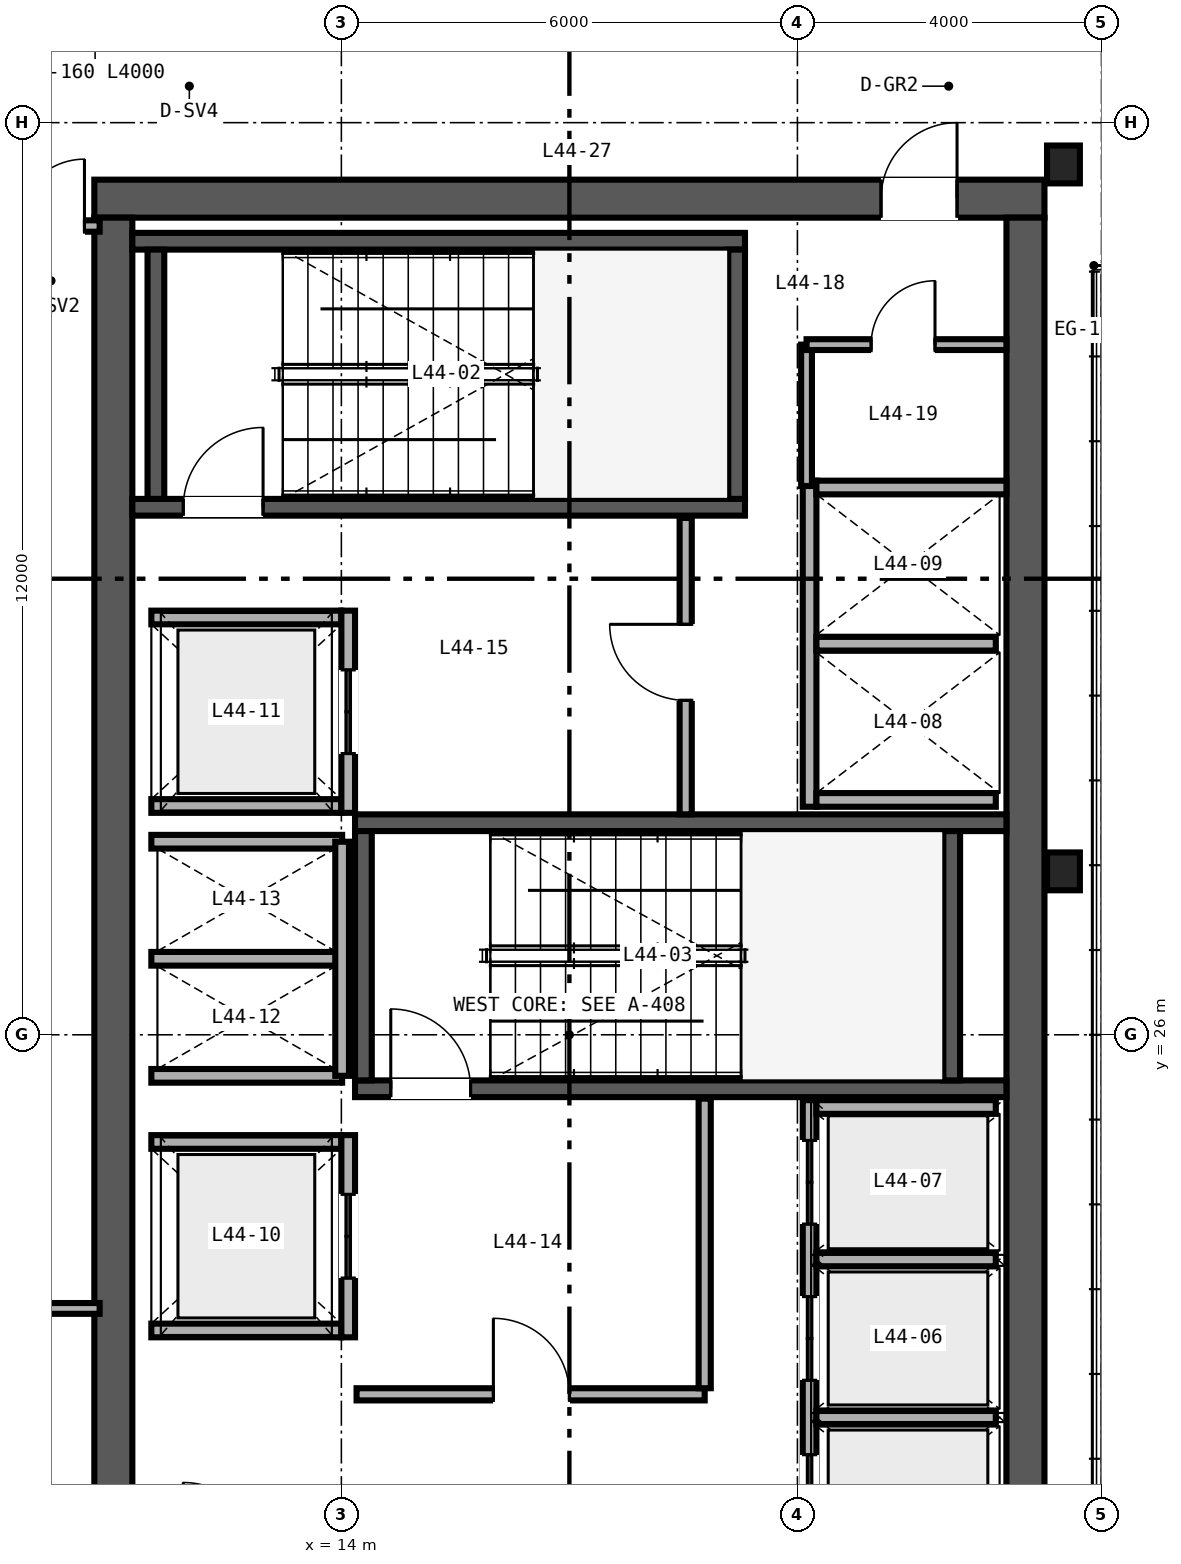
"""IFC4 building model, lengths in metres.
Left out: names, types, materials, properties, quantities, classifications, styles, units other than length and angle.
Written with IfcOpenShell. Run it as: python <this file> out.ifc"""

import sys

from ifc_helpers import new_model, si_unit, direction, frame, frame_2d, origin, origin_2d, place, context, subcontext, project, spatial, rectangle, i_section, extrude, source, transform, mapped, element, fill, save


model = new_model("IFC4")
c1 = context("Model", 3, precision=1e-05, world=origin(), true_north=direction((0.0, 1.0)))
c2 = subcontext(c1, "Body", "Model", "MODEL_VIEW")
j1 = project(units=[si_unit("LENGTHUNIT", "METRE"), si_unit("PLANEANGLEUNIT", "RADIAN")], contexts=[c1])
p1 = place(None, origin())
s1 = spatial("IfcSite", under=j1, at=p1, CompositionType="ELEMENT")
p2 = place(p1, origin())
s2 = spatial("IfcBuilding", under=s1, at=p2, CompositionType="ELEMENT")
p3 = place(p2, frame((0.0, 0.0, 177.6)))
s3 = spatial("IfcBuildingStorey", under=s2, at=p3, CompositionType="ELEMENT", Elevation=177.6)
p4 = place(p3, frame((10.75, 37.0, 0.0), z_axis=(0.0, 0.0, 1.0), x_axis=(1.0, 0.0, 0.0)))
e1 = element("IfcWall", 1, at=p4, inside=s3, PredefinedType="SHEAR", context=c2, shape_type="SweptSolid", body=[
    extrude(rectangle(XDim=12.5, YDim=0.5, at=frame_2d((6.25, 0.0))), origin(), (0.0, 0.0, 1.0), 3.37),
])
p5 = place(p4, frame((10.35, 0.0, 0.0)))
e2 = element("IfcOpeningElement", 2, at=p5, cuts=e1, PredefinedType="OPENING", context=c2, shape_type="SweptSolid", body=[
    extrude(rectangle(XDim=1.0, YDim=2.15, at=frame_2d((0.5, 1.075))), frame((0.0, 0.26, 0.0), z_axis=(0.0, -1.0, 0.0), x_axis=(1.0, 0.0, 0.0)), (0.0, 0.0, 1.0), 0.52),
])
for number, where, z_axis, x_axis in (
    (3, (11.0, 15.25, 0.0), (0.0, 0.0, 1.0), (0.0, 1.0, 0.0)),
    (4, (23.0, 15.25, 0.0), (0.0, 0.0, 1.0), (0.0, 1.0, 0.0)),
):
    element("IfcWall", number, at=place(p3, frame(where, z_axis=z_axis, x_axis=x_axis)), inside=s3, PredefinedType="SHEAR", context=c2, shape_type="SweptSolid", body=[
        extrude(rectangle(XDim=21.5, YDim=0.5, at=frame_2d((10.75, 0.0))), origin(), (0.0, 0.0, 1.0), 3.37),
    ])
p6 = place(p3, frame((11.25, 32.94, 0.0), z_axis=(0.0, 0.0, 1.0), x_axis=(1.0, 0.0, 0.0)))
e5 = element("IfcWall", 5, at=p6, inside=s3, PredefinedType="SHEAR", context=c2, shape_type="SweptSolid", body=[
    extrude(rectangle(XDim=8.06, YDim=0.22, at=frame_2d((4.03, 0.0))), origin(), (0.0, 0.0, 1.0), 3.4),
])
p7 = place(p6, frame((0.67, 0.0, 0.0)))
e6 = element("IfcOpeningElement", 6, at=p7, cuts=e5, PredefinedType="OPENING", context=c2, shape_type="SweptSolid", body=[
    extrude(rectangle(XDim=1.05, YDim=2.15, at=frame_2d((0.525, 1.075))), frame((0.0, 0.12, 0.0), z_axis=(0.0, -1.0, 0.0), x_axis=(1.0, 0.0, 0.0)), (0.0, 0.0, 1.0), 0.24),
])
p8 = place(p3, frame((11.25, 36.44, 0.0), z_axis=(0.0, 0.0, 1.0), x_axis=(1.0, 0.0, 0.0)))
e7 = element("IfcWall", 7, at=p8, inside=s3, PredefinedType="SHEAR", context=c2, shape_type="SweptSolid", body=[
    extrude(rectangle(XDim=8.06, YDim=0.22, at=frame_2d((4.03, 0.0))), origin(), (0.0, 0.0, 1.0), 3.4),
])
for number, where, z_axis, x_axis in (
    (8, (11.56, 33.05, 0.0), (0.0, 0.0, 1.0), (0.0, 1.0, 0.0)),
    (9, (19.2, 33.05, 0.0), (0.0, 0.0, 1.0), (0.0, 1.0, 0.0)),
):
    element("IfcWall", number, at=place(p3, frame(where, z_axis=z_axis, x_axis=x_axis)), inside=s3, PredefinedType="SHEAR", context=c2, shape_type="SweptSolid", body=[
        extrude(rectangle(XDim=3.28, YDim=0.22, at=frame_2d((1.64, 0.0))), origin(), (0.0, 0.0, 1.0), 3.4),
    ])
p9 = place(p3, frame((14.18, 25.29, 0.0), z_axis=(0.0, 0.0, 1.0), x_axis=(1.0, 0.0, 0.0)))
e10 = element("IfcWall", 10, at=p9, inside=s3, PredefinedType="SHEAR", context=c2, shape_type="SweptSolid", body=[
    extrude(rectangle(XDim=8.57, YDim=0.22, at=frame_2d((4.285, 0.0))), origin(), (0.0, 0.0, 1.0), 3.4),
])
p10 = place(p9, frame((0.47, 0.0, 0.0)))
e11 = element("IfcOpeningElement", 11, at=p10, cuts=e10, PredefinedType="OPENING", context=c2, shape_type="SweptSolid", body=[
    extrude(rectangle(XDim=1.05, YDim=2.15, at=frame_2d((0.525, 1.075))), frame((0.0, 0.12, 0.0), z_axis=(0.0, -1.0, 0.0), x_axis=(1.0, 0.0, 0.0)), (0.0, 0.0, 1.0), 0.24),
])
p11 = place(p3, frame((14.18, 28.79, 0.0), z_axis=(0.0, 0.0, 1.0), x_axis=(1.0, 0.0, 0.0)))
e12 = element("IfcWall", 12, at=p11, inside=s3, PredefinedType="SHEAR", context=c2, shape_type="SweptSolid", body=[
    extrude(rectangle(XDim=8.57, YDim=0.22, at=frame_2d((4.285, 0.0))), origin(), (0.0, 0.0, 1.0), 3.4),
])
for number, where, z_axis, x_axis in (
    (13, (14.29, 25.4, 0.0), (0.0, 0.0, 1.0), (0.0, 1.0, 0.0)),
    (14, (22.03, 25.4, 0.0), (0.0, 0.0, 1.0), (0.0, 1.0, 0.0)),
):
    element("IfcWall", number, at=place(p3, frame(where, z_axis=z_axis, x_axis=x_axis)), inside=s3, PredefinedType="SHEAR", context=c2, shape_type="SweptSolid", body=[
        extrude(rectangle(XDim=3.28, YDim=0.22, at=frame_2d((1.64, 0.0))), origin(), (0.0, 0.0, 1.0), 3.4),
    ])
m1 = source(origin(), c2, "Body", "SweptSolid", [
    extrude(i_section(OverallWidth=0.432, OverallDepth=0.498, WebThickness=0.056, FlangeThickness=0.089, FilletRadius=0.025, at=origin_2d()), origin(), (0.0, 0.0, 1.0), 3.37),
])
for number, where, z_axis, x_axis in (
    (15, (23.5, 28.15, 0.0), (0.0, 0.0, 1.0), (1.0, 0.0, 0.0)),
    (16, (23.5, 37.45, 0.0), (0.0, 0.0, 1.0), (1.0, 0.0, 0.0)),
):
    element("IfcColumn", number, at=place(p3, frame(where, z_axis=z_axis, x_axis=x_axis)), inside=s3, PredefinedType="COLUMN", context=c2, shape_type="MappedRepresentation", body=[
        mapped(m1, transform((0.0, 0.0, 0.0), scale=1.0)),
    ])
p12 = place(p3, frame((20.16, 18.82, 0.0), z_axis=(0.0, 0.0, 1.0), x_axis=(0.0, 1.0, 0.0)))
e17 = element("IfcWall", 17, at=p12, inside=s3, PredefinedType="SOLIDWALL", context=c2, shape_type="SweptSolid", body=[
    extrude(rectangle(XDim=6.32, YDim=0.18, at=frame_2d((3.16, 0.0))), origin(), (0.0, 0.0, 1.0), 2.47),
])
p13 = place(p12, frame((0.555, 0.0, 0.0)))
e18 = element("IfcOpeningElement", 18, at=p13, cuts=e17, PredefinedType="OPENING", context=c2, shape_type="SweptSolid", body=[
    extrude(rectangle(XDim=1.1, YDim=2.2, at=frame_2d((0.55, 1.1))), frame((0.0, 0.1, 0.0), z_axis=(0.0, -1.0, 0.0), x_axis=(1.0, 0.0, 0.0)), (0.0, 0.0, 1.0), 0.2),
])
p14 = place(p12, frame((2.635, 0.0, 0.0)))
e19 = element("IfcOpeningElement", 19, at=p14, cuts=e17, PredefinedType="OPENING", context=c2, shape_type="SweptSolid", body=[
    extrude(rectangle(XDim=1.1, YDim=2.2, at=frame_2d((0.55, 1.1))), frame((0.0, 0.1, 0.0), z_axis=(0.0, -1.0, 0.0), x_axis=(1.0, 0.0, 0.0)), (0.0, 0.0, 1.0), 0.2),
])
p15 = place(p12, frame((4.69, 0.0, 0.0)))
e20 = element("IfcOpeningElement", 20, at=p15, cuts=e17, PredefinedType="OPENING", context=c2, shape_type="SweptSolid", body=[
    extrude(rectangle(XDim=1.1, YDim=2.2, at=frame_2d((0.55, 1.1))), frame((0.0, 0.1, 0.0), z_axis=(0.0, -1.0, 0.0), x_axis=(1.0, 0.0, 0.0)), (0.0, 0.0, 1.0), 0.2),
])
p16 = place(p3, frame((20.25, 25.05, 0.0), z_axis=(0.0, 0.0, 1.0), x_axis=(1.0, 0.0, 0.0)))
e21 = element("IfcWall", 21, at=p16, inside=s3, PredefinedType="SOLIDWALL", context=c2, shape_type="SweptSolid", body=[
    extrude(rectangle(XDim=2.36, YDim=0.18, at=frame_2d((1.18, 0.0))), origin(), (0.0, 0.0, 1.0), 3.37),
])
p17 = place(p3, frame((20.25, 20.965, 0.0), z_axis=(0.0, 0.0, 1.0), x_axis=(1.0, 0.0, 0.0)))
e22 = element("IfcWall", 22, at=p17, inside=s3, PredefinedType="SOLIDWALL", context=c2, shape_type="SweptSolid", body=[
    extrude(rectangle(XDim=2.36, YDim=0.18, at=frame_2d((1.18, 0.0))), origin(), (0.0, 0.0, 1.0), 2.47),
])
p18 = place(p3, frame((20.25, 23.045, 0.0), z_axis=(0.0, 0.0, 1.0), x_axis=(1.0, 0.0, 0.0)))
e23 = element("IfcWall", 23, at=p18, inside=s3, PredefinedType="SOLIDWALL", context=c2, shape_type="SweptSolid", body=[
    extrude(rectangle(XDim=2.36, YDim=0.18, at=frame_2d((1.18, 0.0))), origin(), (0.0, 0.0, 1.0), 3.37),
])
p19 = place(p3, frame((20.16, 29.0, 0.0), z_axis=(0.0, 0.0, 1.0), x_axis=(0.0, 1.0, 0.0)))
e24 = element("IfcWall", 24, at=p19, inside=s3, PredefinedType="SOLIDWALL", context=c2, shape_type="SweptSolid", body=[
    extrude(rectangle(XDim=4.29, YDim=0.18, at=frame_2d((2.145, 0.0))), origin(), (0.0, 0.0, 1.0), 3.37),
])
p20 = place(p3, frame((20.25, 29.09, 0.0), z_axis=(0.0, 0.0, 1.0), x_axis=(1.0, 0.0, 0.0)))
e25 = element("IfcWall", 25, at=p20, inside=s3, PredefinedType="SOLIDWALL", context=c2, shape_type="SweptSolid", body=[
    extrude(rectangle(XDim=2.36, YDim=0.18, at=frame_2d((1.18, 0.0))), origin(), (0.0, 0.0, 1.0), 3.37),
])
p21 = place(p3, frame((20.25, 33.2, 0.0), z_axis=(0.0, 0.0, 1.0), x_axis=(1.0, 0.0, 0.0)))
e26 = element("IfcWall", 26, at=p21, inside=s3, PredefinedType="SOLIDWALL", context=c2, shape_type="SweptSolid", body=[
    extrude(rectangle(XDim=2.5, YDim=0.18, at=frame_2d((1.25, 0.0))), origin(), (0.0, 0.0, 1.0), 3.37),
])
p22 = place(p3, frame((20.25, 31.145, 0.0), z_axis=(0.0, 0.0, 1.0), x_axis=(1.0, 0.0, 0.0)))
e27 = element("IfcWall", 27, at=p22, inside=s3, PredefinedType="SOLIDWALL", context=c2, shape_type="SweptSolid", body=[
    extrude(rectangle(XDim=2.36, YDim=0.18, at=frame_2d((1.18, 0.0))), origin(), (0.0, 0.0, 1.0), 3.37),
])
for number, where, z_axis, x_axis in (
    (28, (11.5, 22.11, 0.0), (0.0, 0.0, 1.0), (1.0, 0.0, 0.0)),
    (29, (11.5, 24.59, 0.0), (0.0, 0.0, 1.0), (1.0, 0.0, 0.0)),
):
    element("IfcWall", number, at=place(p3, frame(where, z_axis=z_axis, x_axis=x_axis)), inside=s3, PredefinedType="SOLIDWALL", context=c2, shape_type="SweptSolid", body=[
        extrude(rectangle(XDim=2.5, YDim=0.18, at=frame_2d((1.25, 0.0))), origin(), (0.0, 0.0, 1.0), 3.37),
    ])
p23 = place(p3, frame((14.09, 22.02, 0.0), z_axis=(0.0, 0.0, 1.0), x_axis=(0.0, 1.0, 0.0)))
e30 = element("IfcWall", 30, at=p23, inside=s3, PredefinedType="SOLIDWALL", context=c2, shape_type="SweptSolid", body=[
    extrude(rectangle(XDim=2.66, YDim=0.18, at=frame_2d((1.33, 0.0))), origin(), (0.0, 0.0, 1.0), 3.37),
])
p24 = place(p23, frame((0.78, 0.0, 0.0)))
e31 = element("IfcOpeningElement", 31, at=p24, cuts=e30, PredefinedType="OPENING", context=c2, shape_type="SweptSolid", body=[
    extrude(rectangle(XDim=1.1, YDim=2.2, at=frame_2d((0.55, 1.1))), frame((0.0, 0.1, 0.0), z_axis=(0.0, -1.0, 0.0), x_axis=(1.0, 0.0, 0.0)), (0.0, 0.0, 1.0), 0.2),
])
for number, where, z_axis, x_axis in (
    (32, (11.5, 29.01, 0.0), (0.0, 0.0, 1.0), (1.0, 0.0, 0.0)),
    (33, (11.5, 31.49, 0.0), (0.0, 0.0, 1.0), (1.0, 0.0, 0.0)),
):
    element("IfcWall", number, at=place(p3, frame(where, z_axis=z_axis, x_axis=x_axis)), inside=s3, PredefinedType="SOLIDWALL", context=c2, shape_type="SweptSolid", body=[
        extrude(rectangle(XDim=2.5, YDim=0.18, at=frame_2d((1.25, 0.0))), origin(), (0.0, 0.0, 1.0), 3.37),
    ])
p25 = place(p3, frame((14.09, 28.92, 0.0), z_axis=(0.0, 0.0, 1.0), x_axis=(0.0, 1.0, 0.0)))
e34 = element("IfcWall", 34, at=p25, inside=s3, PredefinedType="SOLIDWALL", context=c2, shape_type="SweptSolid", body=[
    extrude(rectangle(XDim=2.66, YDim=0.18, at=frame_2d((1.33, 0.0))), origin(), (0.0, 0.0, 1.0), 3.37),
])
p26 = place(p25, frame((0.78, 0.0, 0.0)))
e35 = element("IfcOpeningElement", 35, at=p26, cuts=e34, PredefinedType="OPENING", context=c2, shape_type="SweptSolid", body=[
    extrude(rectangle(XDim=1.1, YDim=2.2, at=frame_2d((0.55, 1.1))), frame((0.0, 0.1, 0.0), z_axis=(0.0, -1.0, 0.0), x_axis=(1.0, 0.0, 0.0)), (0.0, 0.0, 1.0), 0.2),
])
for number, where, z_axis, x_axis in (
    (36, (11.5, 25.46, 0.0), (0.0, 0.0, 1.0), (1.0, 0.0, 0.0)),
    (37, (11.5, 27.0, 0.0), (0.0, 0.0, 1.0), (1.0, 0.0, 0.0)),
    (38, (11.5, 28.54, 0.0), (0.0, 0.0, 1.0), (1.0, 0.0, 0.0)),
):
    element("IfcWall", number, at=place(p3, frame(where, z_axis=z_axis, x_axis=x_axis)), inside=s3, PredefinedType="SOLIDWALL", context=c2, shape_type="SweptSolid", body=[
        extrude(rectangle(XDim=2.51, YDim=0.18, at=frame_2d((1.255, 0.0))), origin(), (0.0, 0.0, 1.0), 3.37),
    ])
p27 = place(p3, frame((14.01, 25.46, 0.0), z_axis=(0.0, 0.0, 1.0), x_axis=(0.0, 1.0, 0.0)))
e39 = element("IfcWall", 39, at=p27, inside=s3, PredefinedType="SOLIDWALL", context=c2, shape_type="SweptSolid", body=[
    extrude(rectangle(XDim=3.08, YDim=0.18, at=frame_2d((1.54, 0.0))), origin(), (0.0, 0.0, 1.0), 3.37),
])
p28 = place(p3, frame((14.2, 21.27, 0.0), z_axis=(0.0, 0.0, 1.0), x_axis=(1.0, 0.0, 0.0)))
e40 = element("IfcWall", 40, at=p28, inside=s3, PredefinedType="PARTITIONING", context=c2, shape_type="SweptSolid", body=[
    extrude(rectangle(XDim=4.58, YDim=0.16, at=frame_2d((2.29, 0.0))), origin(), (0.0, 0.0, 1.0), 3.37),
])
p29 = place(p28, frame((1.8, 0.0, 0.0)))
e41 = element("IfcOpeningElement", 41, at=p29, cuts=e40, PredefinedType="OPENING", context=c2, shape_type="SweptSolid", body=[
    extrude(rectangle(XDim=1.0, YDim=2.15, at=frame_2d((0.5, 1.075))), frame((0.0, 0.09, 0.0), z_axis=(0.0, -1.0, 0.0), x_axis=(1.0, 0.0, 0.0)), (0.0, 0.0, 1.0), 0.18),
])
p30 = place(p3, frame((18.78, 21.35, 0.0), z_axis=(0.0, 0.0, 1.0), x_axis=(0.0, 1.0, 0.0)))
e42 = element("IfcWall", 42, at=p30, inside=s3, PredefinedType="PARTITIONING", context=c2, shape_type="SweptSolid", body=[
    extrude(rectangle(XDim=3.81, YDim=0.16, at=frame_2d((1.905, 0.0))), origin(), (0.0, 0.0, 1.0), 3.37),
])
p31 = place(p3, frame((18.53, 28.9, 0.0), z_axis=(0.0, 0.0, 1.0), x_axis=(0.0, 1.0, 0.0)))
e43 = element("IfcWall", 43, at=p31, inside=s3, PredefinedType="PARTITIONING", context=c2, shape_type="SweptSolid", body=[
    extrude(rectangle(XDim=3.9, YDim=0.16, at=frame_2d((1.95, 0.0))), origin(), (0.0, 0.0, 1.0), 3.37),
])
p32 = place(p31, frame((1.5, 0.0, 0.0)))
e44 = element("IfcOpeningElement", 44, at=p32, cuts=e43, PredefinedType="OPENING", context=c2, shape_type="SweptSolid", body=[
    extrude(rectangle(XDim=1.0, YDim=2.15, at=frame_2d((0.5, 1.075))), frame((0.0, 0.09, 0.0), z_axis=(0.0, -1.0, 0.0), x_axis=(1.0, 0.0, 0.0)), (0.0, 0.0, 1.0), 0.18),
])
p33 = place(p3, frame((20.12, 33.22, 0.0), z_axis=(0.0, 0.0, 1.0), x_axis=(0.0, 1.0, 0.0)))
e45 = element("IfcWall", 45, at=p33, inside=s3, PredefinedType="PARTITIONING", context=c2, shape_type="SweptSolid", body=[
    extrude(rectangle(XDim=1.86, YDim=0.142, at=frame_2d((0.93, 0.0))), origin(), (0.0, 0.0, 1.0), 3.37),
])
p34 = place(p3, frame((20.12, 35.08, 0.0), z_axis=(0.0, 0.0, 1.0), x_axis=(1.0, 0.0, 0.0)))
e46 = element("IfcWall", 46, at=p34, inside=s3, PredefinedType="PARTITIONING", context=c2, shape_type="SweptSolid", body=[
    extrude(rectangle(XDim=2.63, YDim=0.142, at=frame_2d((1.315, 0.0))), origin(), (0.0, 0.0, 1.0), 3.37),
])
p35 = place(p34, frame((0.85, 0.0, 0.0)))
e47 = element("IfcOpeningElement", 47, at=p35, cuts=e46, PredefinedType="OPENING", context=c2, shape_type="SweptSolid", body=[
    extrude(rectangle(XDim=0.84, YDim=2.1, at=frame_2d((0.42, 1.05))), frame((0.0, 0.081, 0.0), z_axis=(0.0, -1.0, 0.0), x_axis=(1.0, 0.0, 0.0)), (0.0, 0.0, 1.0), 0.162),
])
p36 = place(p3, frame((8.16, 36.64, 0.0), z_axis=(0.0, 0.0, 1.0), x_axis=(1.0, 0.0, 0.0)))
e48 = element("IfcWall", 48, at=p36, inside=s3, PredefinedType="PARTITIONING", context=c2, shape_type="SweptSolid", body=[
    extrude(rectangle(XDim=2.66, YDim=0.15, at=frame_2d((1.33, 0.0))), origin(), (0.0, 0.0, 1.0), 2.753),
])
p37 = place(p36, frame((1.58, 0.0, 0.0)))
e49 = element("IfcOpeningElement", 49, at=p37, cuts=e48, PredefinedType="OPENING", context=c2, shape_type="SweptSolid", body=[
    extrude(rectangle(XDim=0.88, YDim=2.15, at=frame_2d((0.44, 1.075))), frame((0.0, 0.085, 0.0), z_axis=(0.0, -1.0, 0.0), x_axis=(1.0, 0.0, 0.0)), (0.0, 0.0, 1.0), 0.17),
])
p38 = place(p3, frame((8.16, 22.4, 0.0), z_axis=(0.0, 0.0, 1.0), x_axis=(1.0, 0.0, 0.0)))
e50 = element("IfcWall", 50, at=p38, inside=s3, PredefinedType="PARTITIONING", context=c2, shape_type="SweptSolid", body=[
    extrude(rectangle(XDim=2.66, YDim=0.142, at=frame_2d((1.33, 0.0))), origin(), (0.0, 0.0, 1.0), 2.591),
])
m2 = source(origin(), c2, "Body", "SweptSolid", [
    extrude(rectangle(XDim=1.05, YDim=2.15, at=frame_2d((0.525, 1.075))), frame((0.0, 0.025, 0.0), z_axis=(0.0, -1.0, 0.0), x_axis=(1.0, 0.0, 0.0)), (0.0, 0.0, 1.0), 0.05),
])
p39 = place(p7, origin())
e51 = element("IfcDoor", 51, at=p39, inside=s3, OperationType="SINGLE_SWING_RIGHT", PredefinedType="DOOR", context=c2, shape_type="MappedRepresentation", body=[
    mapped(m2, transform((0.0, 0.0, 0.0), scale=1.0)),
])
fill(e6, e51)
p40 = place(p10, origin())
e52 = element("IfcDoor", 52, at=p40, inside=s3, OperationType="SINGLE_SWING_LEFT", PredefinedType="DOOR", context=c2, shape_type="MappedRepresentation", body=[
    mapped(m2, transform((0.0, 0.0, 0.0), scale=1.0)),
])
fill(e11, e52)
m3 = source(origin(), c2, "Body", "SweptSolid", [
    extrude(rectangle(XDim=1.1, YDim=2.2, at=frame_2d((0.55, 1.1))), frame((0.0, 0.025, 0.0), z_axis=(0.0, -1.0, 0.0), x_axis=(1.0, 0.0, 0.0)), (0.0, 0.0, 1.0), 0.05),
])
p41 = place(p13, origin())
e53 = element("IfcDoor", 53, at=p41, inside=s3, OperationType="DOUBLE_DOOR_SLIDING", PredefinedType="DOOR", context=c2, shape_type="MappedRepresentation", body=[
    mapped(m3, transform((0.0, 0.0, 0.0), scale=1.0)),
])
fill(e18, e53)
p42 = place(p14, origin())
e54 = element("IfcDoor", 54, at=p42, inside=s3, OperationType="DOUBLE_DOOR_SLIDING", PredefinedType="DOOR", context=c2, shape_type="MappedRepresentation", body=[
    mapped(m3, transform((0.0, 0.0, 0.0), scale=1.0)),
])
fill(e19, e54)
p43 = place(p15, origin())
e55 = element("IfcDoor", 55, at=p43, inside=s3, OperationType="DOUBLE_DOOR_SLIDING", PredefinedType="DOOR", context=c2, shape_type="MappedRepresentation", body=[
    mapped(m3, transform((0.0, 0.0, 0.0), scale=1.0)),
])
fill(e20, e55)
p44 = place(p24, origin())
e56 = element("IfcDoor", 56, at=p44, inside=s3, OperationType="DOUBLE_DOOR_SLIDING", PredefinedType="DOOR", context=c2, shape_type="MappedRepresentation", body=[
    mapped(m3, transform((0.0, 0.0, 0.0), scale=1.0)),
])
fill(e31, e56)
p45 = place(p26, origin())
e57 = element("IfcDoor", 57, at=p45, inside=s3, OperationType="DOUBLE_DOOR_SLIDING", PredefinedType="DOOR", context=c2, shape_type="MappedRepresentation", body=[
    mapped(m3, transform((0.0, 0.0, 0.0), scale=1.0)),
])
fill(e35, e57)
m4 = source(origin(), c2, "Body", "SweptSolid", [
    extrude(rectangle(XDim=1.0, YDim=2.15, at=frame_2d((0.5, 1.075))), frame((0.0, 0.025, 0.0), z_axis=(0.0, -1.0, 0.0), x_axis=(1.0, 0.0, 0.0)), (0.0, 0.0, 1.0), 0.05),
])
p46 = place(p29, origin())
e58 = element("IfcDoor", 58, at=p46, inside=s3, OperationType="SINGLE_SWING_LEFT", PredefinedType="DOOR", context=c2, shape_type="MappedRepresentation", body=[
    mapped(m4, transform((0.0, 0.0, 0.0), scale=1.0)),
])
fill(e41, e58)
p47 = place(p32, origin())
e59 = element("IfcDoor", 59, at=p47, inside=s3, OperationType="SINGLE_SWING_RIGHT", PredefinedType="DOOR", context=c2, shape_type="MappedRepresentation", body=[
    mapped(m4, transform((0.0, 0.0, 0.0), scale=1.0)),
])
fill(e44, e59)
m5 = source(origin(), c2, "Body", "SweptSolid", [
    extrude(rectangle(XDim=0.84, YDim=2.1, at=frame_2d((0.42, 1.05))), frame((0.0, 0.025, 0.0), z_axis=(0.0, -1.0, 0.0), x_axis=(1.0, 0.0, 0.0)), (0.0, 0.0, 1.0), 0.05),
])
p48 = place(p35, origin())
e60 = element("IfcDoor", 60, at=p48, inside=s3, OperationType="SINGLE_SWING_RIGHT", PredefinedType="DOOR", context=c2, shape_type="MappedRepresentation", body=[
    mapped(m5, transform((0.0, 0.0, 0.0), scale=1.0)),
])
fill(e47, e60)
p49 = place(p5, origin())
e61 = element("IfcDoor", 61, at=p49, inside=s3, OperationType="SINGLE_SWING_RIGHT", PredefinedType="DOOR", context=c2, shape_type="MappedRepresentation", body=[
    mapped(m4, transform((0.0, 0.0, 0.0), scale=1.0)),
])
fill(e2, e61)
m6 = source(origin(), c2, "Body", "SweptSolid", [
    extrude(rectangle(XDim=0.88, YDim=2.15, at=frame_2d((0.44, 1.075))), frame((0.0, 0.025, 0.0), z_axis=(0.0, -1.0, 0.0), x_axis=(1.0, 0.0, 0.0)), (0.0, 0.0, 1.0), 0.05),
])
p50 = place(p37, origin())
e62 = element("IfcDoor", 62, at=p50, inside=s3, OperationType="SINGLE_SWING_RIGHT", PredefinedType="DOOR", context=c2, shape_type="MappedRepresentation", body=[
    mapped(m6, transform((0.0, 0.0, 0.0), scale=1.0)),
])
fill(e49, e62)
save(model, sys.argv[1])
